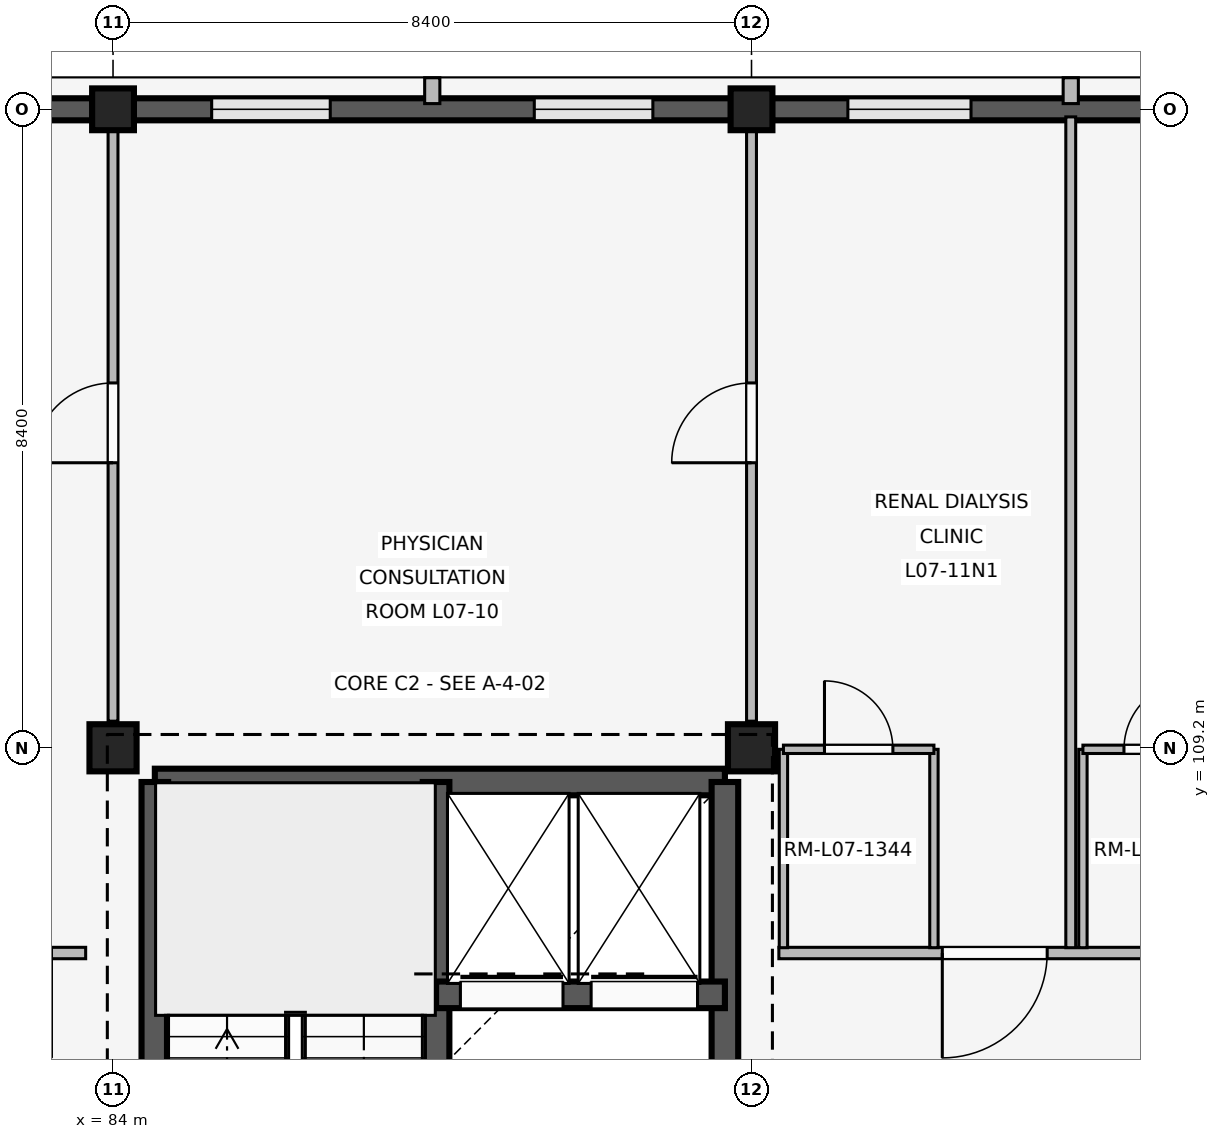
"""IFC4 building model, lengths in metres.
Left out: names, types, materials, properties, quantities, classifications, styles, units other than length and angle.
Written with IfcOpenShell. Run it as: python <this file> out.ifc"""

import sys

from ifc_helpers import new_model, si_unit, direction, frame, frame_2d, origin, origin_2d, place, context, subcontext, project, spatial, rectangle, extrude, element, fill, save


model = new_model("IFC4")
c1 = context("Model", 3, precision=1e-05, world=origin(), true_north=direction((0.0, 1.0)))
c2 = subcontext(c1, "Body", "Model", "MODEL_VIEW")
j1 = project(units=[si_unit("LENGTHUNIT", "METRE"), si_unit("PLANEANGLEUNIT", "RADIAN")], contexts=[c1])
p1 = place(None, origin())
s1 = spatial("IfcSite", under=j1, at=p1, CompositionType="ELEMENT")
p2 = place(p1, origin())
s2 = spatial("IfcBuilding", under=s1, at=p2, CompositionType="ELEMENT")
p3 = place(p2, frame((0.0, 0.0, 28.8)))
s3 = spatial("IfcBuildingStorey", under=s2, at=p3, CompositionType="ELEMENT", Elevation=28.8)
p4 = place(p3, frame((84.0, 109.2, 0.0), z_axis=(0.0, 0.0, 1.0), x_axis=(1.0, 0.0, 0.0)))
e1 = element("IfcColumn", 1, at=p4, inside=s3, PredefinedType="COLUMN", context=c2, shape_type="SweptSolid", body=[
    extrude(rectangle(XDim=0.62, YDim=0.62, at=origin_2d()), origin(), (0.0, 0.0, 1.0), 4.2),
])
p5 = place(p3, frame((84.0, 117.6, 0.0), z_axis=(0.0, 0.0, 1.0), x_axis=(1.0, 0.0, 0.0)))
e2 = element("IfcColumn", 2, at=p5, inside=s3, PredefinedType="COLUMN", context=c2, shape_type="SweptSolid", body=[
    extrude(rectangle(XDim=0.55, YDim=0.55, at=origin_2d()), origin(), (0.0, 0.0, 1.0), 4.2),
])
p6 = place(p3, frame((92.4, 109.2, 0.0), z_axis=(0.0, 0.0, 1.0), x_axis=(1.0, 0.0, 0.0)))
e3 = element("IfcColumn", 3, at=p6, inside=s3, PredefinedType="COLUMN", context=c2, shape_type="SweptSolid", body=[
    extrude(rectangle(XDim=0.62, YDim=0.62, at=origin_2d()), origin(), (0.0, 0.0, 1.0), 4.2),
])
p7 = place(p3, frame((92.4, 117.6, 0.0), z_axis=(0.0, 0.0, 1.0), x_axis=(1.0, 0.0, 0.0)))
e4 = element("IfcColumn", 4, at=p7, inside=s3, PredefinedType="COLUMN", context=c2, shape_type="SweptSolid", body=[
    extrude(rectangle(XDim=0.55, YDim=0.55, at=origin_2d()), origin(), (0.0, 0.0, 1.0), 4.2),
])
p8 = place(p3, frame((75.87, 117.6, 0.0), z_axis=(0.0, 0.0, 1.0), x_axis=(1.0, 0.0, 0.0)))
e5 = element("IfcWall", 5, at=p8, inside=s3, PredefinedType="SOLIDWALL", context=c2, shape_type="SweptSolid", body=[
    extrude(rectangle(XDim=7.86, YDim=0.29, at=frame_2d((3.93, 0.0))), origin(), (0.0, 0.0, 1.0), 3.34),
])
p9 = place(p8, frame((1.118, 0.0, 0.85)))
e6 = element("IfcOpeningElement", 6, at=p9, cuts=e5, PredefinedType="OPENING", context=c2, shape_type="SweptSolid", body=[
    extrude(rectangle(XDim=1.38, YDim=1.5, at=frame_2d((0.69, 0.75))), frame((0.0, 0.155, 0.0), z_axis=(0.0, -1.0, 0.0), x_axis=(1.0, 0.0, 0.0)), (0.0, 0.0, 1.0), 0.31),
])
p10 = place(p8, frame((5.362, 0.0, 0.85)))
e7 = element("IfcOpeningElement", 7, at=p10, cuts=e5, PredefinedType="OPENING", context=c2, shape_type="SweptSolid", body=[
    extrude(rectangle(XDim=1.38, YDim=1.5, at=frame_2d((0.69, 0.75))), frame((0.0, 0.155, 0.0), z_axis=(0.0, -1.0, 0.0), x_axis=(1.0, 0.0, 0.0)), (0.0, 0.0, 1.0), 0.31),
])
p11 = place(p3, frame((84.27, 117.6, 0.0), z_axis=(0.0, 0.0, 1.0), x_axis=(1.0, 0.0, 0.0)))
e8 = element("IfcWall", 8, at=p11, inside=s3, PredefinedType="SOLIDWALL", context=c2, shape_type="SweptSolid", body=[
    extrude(rectangle(XDim=7.86, YDim=0.29, at=frame_2d((3.93, 0.0))), origin(), (0.0, 0.0, 1.0), 3.34),
])
p12 = place(p11, frame((1.028, 0.0, 0.85)))
e9 = element("IfcOpeningElement", 9, at=p12, cuts=e8, PredefinedType="OPENING", context=c2, shape_type="SweptSolid", body=[
    extrude(rectangle(XDim=1.56, YDim=1.7, at=frame_2d((0.78, 0.85))), frame((0.0, 0.155, 0.0), z_axis=(0.0, -1.0, 0.0), x_axis=(1.0, 0.0, 0.0)), (0.0, 0.0, 1.0), 0.31),
])
p13 = place(p11, frame((5.272, 0.0, 0.85)))
e10 = element("IfcOpeningElement", 10, at=p13, cuts=e8, PredefinedType="OPENING", context=c2, shape_type="SweptSolid", body=[
    extrude(rectangle(XDim=1.56, YDim=1.7, at=frame_2d((0.78, 0.85))), frame((0.0, 0.155, 0.0), z_axis=(0.0, -1.0, 0.0), x_axis=(1.0, 0.0, 0.0)), (0.0, 0.0, 1.0), 0.31),
])
p14 = place(p3, frame((88.2, 117.675, 0.0), z_axis=(0.0, 0.0, 1.0), x_axis=(0.0, 1.0, 0.0)))
e11 = element("IfcWall", 11, at=p14, inside=s3, PredefinedType="ELEMENTEDWALL", context=c2, shape_type="SweptSolid", body=[
    extrude(rectangle(XDim=0.34, YDim=0.2, at=frame_2d((0.17, 0.0))), origin(), (0.0, 0.0, 1.0), 3.32),
])
p15 = place(p3, frame((92.67, 117.6, 0.0), z_axis=(0.0, 0.0, 1.0), x_axis=(1.0, 0.0, 0.0)))
e12 = element("IfcWall", 12, at=p15, inside=s3, PredefinedType="SOLIDWALL", context=c2, shape_type="SweptSolid", body=[
    extrude(rectangle(XDim=7.86, YDim=0.29, at=frame_2d((3.93, 0.0))), origin(), (0.0, 0.0, 1.0), 3.34),
])
p16 = place(p15, frame((0.998, 0.0, 0.85)))
e13 = element("IfcOpeningElement", 13, at=p16, cuts=e12, PredefinedType="OPENING", context=c2, shape_type="SweptSolid", body=[
    extrude(rectangle(XDim=1.62, YDim=1.8, at=frame_2d((0.81, 0.9))), frame((0.0, 0.155, 0.0), z_axis=(0.0, -1.0, 0.0), x_axis=(1.0, 0.0, 0.0)), (0.0, 0.0, 1.0), 0.31),
])
p17 = place(p15, frame((5.242, 0.0, 0.85)))
e14 = element("IfcOpeningElement", 14, at=p17, cuts=e12, PredefinedType="OPENING", context=c2, shape_type="SweptSolid", body=[
    extrude(rectangle(XDim=1.62, YDim=1.8, at=frame_2d((0.81, 0.9))), frame((0.0, 0.155, 0.0), z_axis=(0.0, -1.0, 0.0), x_axis=(1.0, 0.0, 0.0)), (0.0, 0.0, 1.0), 0.31),
])
p18 = place(p3, frame((96.6, 117.675, 0.0), z_axis=(0.0, 0.0, 1.0), x_axis=(0.0, 1.0, 0.0)))
e15 = element("IfcWall", 15, at=p18, inside=s3, PredefinedType="ELEMENTEDWALL", context=c2, shape_type="SweptSolid", body=[
    extrude(rectangle(XDim=0.34, YDim=0.2, at=frame_2d((0.17, 0.0))), origin(), (0.0, 0.0, 1.0), 3.32),
])
p19 = place(p3, frame((84.55, 108.75, 0.0), z_axis=(0.0, 0.0, 1.0), x_axis=(1.0, 0.0, 0.0)))
e16 = element("IfcWall", 16, at=p19, inside=s3, PredefinedType="SHEAR", context=c2, shape_type="SweptSolid", body=[
    extrude(rectangle(XDim=7.5, YDim=0.35, at=frame_2d((3.75, 0.0))), origin(), (0.0, 0.0, 1.0), 3.94),
])
p20 = place(p3, frame((84.55, 101.2, 0.0), z_axis=(0.0, 0.0, 1.0), x_axis=(0.0, 1.0, 0.0)))
e17 = element("IfcWall", 17, at=p20, inside=s3, PredefinedType="SHEAR", context=c2, shape_type="SweptSolid", body=[
    extrude(rectangle(XDim=7.55, YDim=0.35, at=frame_2d((3.775, 0.0))), origin(), (0.0, 0.0, 1.0), 3.94),
])
p21 = place(p20, frame((0.28, 0.0, 0.0)))
e18 = element("IfcOpeningElement", 18, at=p21, cuts=e17, PredefinedType="OPENING", context=c2, shape_type="SweptSolid", body=[
    extrude(rectangle(XDim=1.0, YDim=2.15, at=frame_2d((0.5, 1.075))), frame((0.0, 0.185, 0.0), z_axis=(0.0, -1.0, 0.0), x_axis=(1.0, 0.0, 0.0)), (0.0, 0.0, 1.0), 0.37),
])
p22 = place(p3, frame((92.05, 101.2, 0.0), z_axis=(0.0, 0.0, 1.0), x_axis=(0.0, 1.0, 0.0)))
e19 = element("IfcWall", 19, at=p22, inside=s3, PredefinedType="SHEAR", context=c2, shape_type="SweptSolid", body=[
    extrude(rectangle(XDim=7.55, YDim=0.35, at=frame_2d((3.775, 0.0))), origin(), (0.0, 0.0, 1.0), 3.94),
])
p23 = place(p22, frame((2.4, 0.0, 0.0)))
e20 = element("IfcOpeningElement", 20, at=p23, cuts=e19, PredefinedType="OPENING", context=c2, shape_type="SweptSolid", body=[
    extrude(rectangle(XDim=1.2, YDim=2.2, at=frame_2d((0.6, 1.1))), frame((0.0, 0.185, 0.0), z_axis=(0.0, -1.0, 0.0), x_axis=(1.0, 0.0, 0.0)), (0.0, 0.0, 1.0), 0.37),
])
p24 = place(p3, frame((88.25, 101.2, 0.0), z_axis=(0.0, 0.0, 1.0), x_axis=(0.0, 1.0, 0.0)))
e21 = element("IfcWall", 21, at=p24, inside=s3, PredefinedType="SHEAR", context=c2, shape_type="SweptSolid", body=[
    extrude(rectangle(XDim=7.55, YDim=0.35, at=frame_2d((3.775, 0.0))), origin(), (0.0, 0.0, 1.0), 3.94),
])
p25 = place(p24, frame((0.28, 0.0, 0.0)))
e22 = element("IfcOpeningElement", 22, at=p25, cuts=e21, PredefinedType="OPENING", context=c2, shape_type="SweptSolid", body=[
    extrude(rectangle(XDim=1.0, YDim=2.15, at=frame_2d((0.5, 1.075))), frame((0.0, 0.185, 0.0), z_axis=(0.0, -1.0, 0.0), x_axis=(1.0, 0.0, 0.0)), (0.0, 0.0, 1.0), 0.37),
])
p26 = place(p3, frame((88.25, 105.95, 0.0), z_axis=(0.0, 0.0, 1.0), x_axis=(1.0, 0.0, 0.0)))
e23 = element("IfcWall", 23, at=p26, inside=s3, PredefinedType="SHEAR", context=c2, shape_type="SweptSolid", body=[
    extrude(rectangle(XDim=3.8, YDim=0.35, at=frame_2d((1.9, 0.0))), origin(), (0.0, 0.0, 1.0), 3.94),
])
p27 = place(p26, frame((0.32, 0.0, 0.0)))
e24 = element("IfcOpeningElement", 24, at=p27, cuts=e23, PredefinedType="OPENING", context=c2, shape_type="SweptSolid", body=[
    extrude(rectangle(XDim=1.35, YDim=2.25, at=frame_2d((0.675, 1.125))), frame((0.0, 0.185, 0.0), z_axis=(0.0, -1.0, 0.0), x_axis=(1.0, 0.0, 0.0)), (0.0, 0.0, 1.0), 0.37),
])
p28 = place(p26, frame((2.04, 0.0, 0.0)))
e25 = element("IfcOpeningElement", 25, at=p28, cuts=e23, PredefinedType="OPENING", context=c2, shape_type="SweptSolid", body=[
    extrude(rectangle(XDim=1.4, YDim=2.25, at=frame_2d((0.7, 1.125))), frame((0.0, 0.185, 0.0), z_axis=(0.0, -1.0, 0.0), x_axis=(1.0, 0.0, 0.0)), (0.0, 0.0, 1.0), 0.37),
])
p29 = place(p3, frame((83.64, 106.5, 0.0), z_axis=(0.0, 0.0, 1.0), x_axis=(-1.0, 0.0, 0.0)))
e26 = element("IfcWall", 26, at=p29, inside=s3, PredefinedType="PARTITIONING", context=c2, shape_type="SweptSolid", body=[
    extrude(rectangle(XDim=7.96, YDim=0.15, at=frame_2d((3.98, 0.0))), origin(), (0.0, 0.0, 1.0), 3.32),
])
p30 = place(p29, frame((0.45, 0.0, 0.0)))
e27 = element("IfcOpeningElement", 27, at=p30, cuts=e26, PredefinedType="OPENING", context=c2, shape_type="SweptSolid", body=[
    extrude(rectangle(XDim=1.38, YDim=2.25, at=frame_2d((0.69, 1.125))), frame((0.0, 0.085, 0.0), z_axis=(0.0, -1.0, 0.0), x_axis=(1.0, 0.0, 0.0)), (0.0, 0.0, 1.0), 0.17),
])
p31 = place(p29, frame((4.15, 0.0, 0.0)))
e28 = element("IfcOpeningElement", 28, at=p31, cuts=e26, PredefinedType="OPENING", context=c2, shape_type="SweptSolid", body=[
    extrude(rectangle(XDim=1.38, YDim=2.25, at=frame_2d((0.69, 1.125))), frame((0.0, 0.085, 0.0), z_axis=(0.0, -1.0, 0.0), x_axis=(1.0, 0.0, 0.0)), (0.0, 0.0, 1.0), 0.17),
])
p32 = place(p3, frame((84.0, 109.55, 0.0), z_axis=(0.0, 0.0, 1.0), x_axis=(0.0, 1.0, 0.0)))
e29 = element("IfcWall", 29, at=p32, inside=s3, PredefinedType="PARTITIONING", context=c2, shape_type="SweptSolid", body=[
    extrude(rectangle(XDim=7.91, YDim=0.13, at=frame_2d((3.955, 0.0))), origin(), (0.0, 0.0, 1.0), 3.32),
])
p33 = place(p32, frame((3.4, 0.0, 0.0)))
e30 = element("IfcOpeningElement", 30, at=p33, cuts=e29, PredefinedType="OPENING", context=c2, shape_type="SweptSolid", body=[
    extrude(rectangle(XDim=1.05, YDim=2.2, at=frame_2d((0.525, 1.1))), frame((0.0, 0.075, 0.0), z_axis=(0.0, -1.0, 0.0), x_axis=(1.0, 0.0, 0.0)), (0.0, 0.0, 1.0), 0.15),
])
p34 = place(p3, frame((92.4, 109.55, 0.0), z_axis=(0.0, 0.0, 1.0), x_axis=(0.0, 1.0, 0.0)))
e31 = element("IfcWall", 31, at=p34, inside=s3, PredefinedType="PARTITIONING", context=c2, shape_type="SweptSolid", body=[
    extrude(rectangle(XDim=7.91, YDim=0.13, at=frame_2d((3.955, 0.0))), origin(), (0.0, 0.0, 1.0), 3.32),
])
p35 = place(p34, frame((3.4, 0.0, 0.0)))
e32 = element("IfcOpeningElement", 32, at=p35, cuts=e31, PredefinedType="OPENING", context=c2, shape_type="SweptSolid", body=[
    extrude(rectangle(XDim=1.05, YDim=2.2, at=frame_2d((0.525, 1.1))), frame((0.0, 0.075, 0.0), z_axis=(0.0, -1.0, 0.0), x_axis=(1.0, 0.0, 0.0)), (0.0, 0.0, 1.0), 0.15),
])
p36 = place(p3, frame((100.72, 106.5, 0.0), z_axis=(0.0, 0.0, 1.0), x_axis=(-1.0, 0.0, 0.0)))
e33 = element("IfcWall", 33, at=p36, inside=s3, PredefinedType="PARTITIONING", context=c2, shape_type="SweptSolid", body=[
    extrude(rectangle(XDim=7.96, YDim=0.15, at=frame_2d((3.98, 0.0))), origin(), (0.0, 0.0, 1.0), 3.32),
])
p37 = place(p36, frame((0.73, 0.0, 0.0)))
e34 = element("IfcOpeningElement", 34, at=p37, cuts=e33, PredefinedType="OPENING", context=c2, shape_type="SweptSolid", body=[
    extrude(rectangle(XDim=1.38, YDim=2.25, at=frame_2d((0.69, 1.125))), frame((0.0, 0.085, 0.0), z_axis=(0.0, -1.0, 0.0), x_axis=(1.0, 0.0, 0.0)), (0.0, 0.0, 1.0), 0.17),
])
p38 = place(p36, frame((4.43, 0.0, 0.0)))
e35 = element("IfcOpeningElement", 35, at=p38, cuts=e33, PredefinedType="OPENING", context=c2, shape_type="SweptSolid", body=[
    extrude(rectangle(XDim=1.38, YDim=2.25, at=frame_2d((0.69, 1.125))), frame((0.0, 0.085, 0.0), z_axis=(0.0, -1.0, 0.0), x_axis=(1.0, 0.0, 0.0)), (0.0, 0.0, 1.0), 0.17),
])
p39 = place(p3, frame((96.6, 106.57, 0.0), z_axis=(0.0, 0.0, 1.0), x_axis=(0.0, 1.0, 0.0)))
e36 = element("IfcWall", 36, at=p39, inside=s3, PredefinedType="PARTITIONING", context=c2, shape_type="SweptSolid", body=[
    extrude(rectangle(XDim=10.93, YDim=0.13, at=frame_2d((5.465, 0.0))), origin(), (0.0, 0.0, 1.0), 3.32),
])
for number, where, z_axis, x_axis in (
    (37, (92.82, 106.57, 0.0), (0.0, 0.0, 1.0), (0.0, 1.0, 0.0)),
    (38, (94.8, 106.57, 0.0), (0.0, 0.0, 1.0), (0.0, 1.0, 0.0)),
):
    element("IfcWall", number, at=place(p3, frame(where, z_axis=z_axis, x_axis=x_axis)), inside=s3, PredefinedType="PARTITIONING", context=c2, shape_type="SweptSolid", body=[
        extrude(rectangle(XDim=2.61, YDim=0.11, at=frame_2d((1.305, 0.0))), origin(), (0.0, 0.0, 1.0), 3.32),
    ])
p40 = place(p3, frame((92.82, 109.18, 0.0), z_axis=(0.0, 0.0, 1.0), x_axis=(1.0, 0.0, 0.0)))
e39 = element("IfcWall", 39, at=p40, inside=s3, PredefinedType="PARTITIONING", context=c2, shape_type="SweptSolid", body=[
    extrude(rectangle(XDim=1.98, YDim=0.11, at=frame_2d((0.99, 0.0))), origin(), (0.0, 0.0, 1.0), 3.32),
])
p41 = place(p40, frame((0.54, 0.0, 0.0)))
e40 = element("IfcOpeningElement", 40, at=p41, cuts=e39, PredefinedType="OPENING", context=c2, shape_type="SweptSolid", body=[
    extrude(rectangle(XDim=0.9, YDim=2.1, at=frame_2d((0.45, 1.05))), frame((0.0, 0.065, 0.0), z_axis=(0.0, -1.0, 0.0), x_axis=(1.0, 0.0, 0.0)), (0.0, 0.0, 1.0), 0.13),
])
p42 = place(p3, frame((96.76, 106.57, 0.0), z_axis=(0.0, 0.0, 1.0), x_axis=(0.0, 1.0, 0.0)))
e41 = element("IfcWall", 41, at=p42, inside=s3, PredefinedType="PARTITIONING", context=c2, shape_type="SweptSolid", body=[
    extrude(rectangle(XDim=2.61, YDim=0.11, at=frame_2d((1.305, 0.0))), origin(), (0.0, 0.0, 1.0), 3.32),
])
p43 = place(p3, frame((96.76, 109.18, 0.0), z_axis=(0.0, 0.0, 1.0), x_axis=(1.0, 0.0, 0.0)))
e42 = element("IfcWall", 42, at=p43, inside=s3, PredefinedType="PARTITIONING", context=c2, shape_type="SweptSolid", body=[
    extrude(rectangle(XDim=1.98, YDim=0.11, at=frame_2d((0.99, 0.0))), origin(), (0.0, 0.0, 1.0), 3.32),
])
p44 = place(p43, frame((0.54, 0.0, 0.0)))
e43 = element("IfcOpeningElement", 43, at=p44, cuts=e42, PredefinedType="OPENING", context=c2, shape_type="SweptSolid", body=[
    extrude(rectangle(XDim=0.9, YDim=2.1, at=frame_2d((0.45, 1.05))), frame((0.0, 0.065, 0.0), z_axis=(0.0, -1.0, 0.0), x_axis=(1.0, 0.0, 0.0)), (0.0, 0.0, 1.0), 0.13),
])
p45 = place(p12, origin())
e44 = element("IfcWindow", 44, at=p45, inside=s3, PartitioningType="SINGLE_PANEL", PredefinedType="WINDOW", context=c2, shape_type="SweptSolid", body=[
    extrude(rectangle(XDim=1.56, YDim=1.7, at=frame_2d((0.78, 0.85))), frame((0.0, 0.03, 0.0), z_axis=(0.0, -1.0, 0.0), x_axis=(1.0, 0.0, 0.0)), (0.0, 0.0, 1.0), 0.06),
])
fill(e9, e44)
p46 = place(p13, origin())
e45 = element("IfcWindow", 45, at=p46, inside=s3, PartitioningType="SINGLE_PANEL", PredefinedType="WINDOW", context=c2, shape_type="SweptSolid", body=[
    extrude(rectangle(XDim=1.56, YDim=1.7, at=frame_2d((0.78, 0.85))), frame((0.0, 0.03, 0.0), z_axis=(0.0, -1.0, 0.0), x_axis=(1.0, 0.0, 0.0)), (0.0, 0.0, 1.0), 0.06),
])
fill(e10, e45)
p47 = place(p16, origin())
e46 = element("IfcWindow", 46, at=p47, inside=s3, PartitioningType="SINGLE_PANEL", PredefinedType="WINDOW", context=c2, shape_type="SweptSolid", body=[
    extrude(rectangle(XDim=1.62, YDim=1.8, at=frame_2d((0.81, 0.9))), frame((0.0, 0.03, 0.0), z_axis=(0.0, -1.0, 0.0), x_axis=(1.0, 0.0, 0.0)), (0.0, 0.0, 1.0), 0.06),
])
fill(e13, e46)
p48 = place(p27, origin())
e47 = element("IfcDoor", 47, at=p48, inside=s3, OperationType="SLIDING_TO_LEFT", PredefinedType="DOOR", context=c2, shape_type="SweptSolid", body=[
    extrude(rectangle(XDim=1.35, YDim=2.25, at=frame_2d((0.675, 1.125))), frame((0.0, 0.025, 0.0), z_axis=(0.0, -1.0, 0.0), x_axis=(1.0, 0.0, 0.0)), (0.0, 0.0, 1.0), 0.05),
])
fill(e24, e47)
p49 = place(p28, origin())
e48 = element("IfcDoor", 48, at=p49, inside=s3, OperationType="SLIDING_TO_LEFT", PredefinedType="DOOR", context=c2, shape_type="SweptSolid", body=[
    extrude(rectangle(XDim=1.4, YDim=2.25, at=frame_2d((0.7, 1.125))), frame((0.0, 0.025, 0.0), z_axis=(0.0, -1.0, 0.0), x_axis=(1.0, 0.0, 0.0)), (0.0, 0.0, 1.0), 0.05),
])
fill(e25, e48)
p50 = place(p33, origin())
e49 = element("IfcDoor", 49, at=p50, inside=s3, OperationType="SINGLE_SWING_LEFT", PredefinedType="DOOR", context=c2, shape_type="SweptSolid", body=[
    extrude(rectangle(XDim=1.05, YDim=2.2, at=frame_2d((0.525, 1.1))), frame((0.0, 0.025, 0.0), z_axis=(0.0, -1.0, 0.0), x_axis=(1.0, 0.0, 0.0)), (0.0, 0.0, 1.0), 0.05),
])
fill(e30, e49)
p51 = place(p35, origin())
e50 = element("IfcDoor", 50, at=p51, inside=s3, OperationType="SINGLE_SWING_LEFT", PredefinedType="DOOR", context=c2, shape_type="SweptSolid", body=[
    extrude(rectangle(XDim=1.05, YDim=2.2, at=frame_2d((0.525, 1.1))), frame((0.0, 0.025, 0.0), z_axis=(0.0, -1.0, 0.0), x_axis=(1.0, 0.0, 0.0)), (0.0, 0.0, 1.0), 0.05),
])
fill(e32, e50)
p52 = place(p38, origin())
e51 = element("IfcDoor", 51, at=p52, inside=s3, OperationType="SINGLE_SWING_RIGHT", PredefinedType="DOOR", context=c2, shape_type="SweptSolid", body=[
    extrude(rectangle(XDim=1.38, YDim=2.25, at=frame_2d((0.69, 1.125))), frame((0.0, 0.025, 0.0), z_axis=(0.0, -1.0, 0.0), x_axis=(1.0, 0.0, 0.0)), (0.0, 0.0, 1.0), 0.05),
])
fill(e35, e51)
p53 = place(p41, origin())
e52 = element("IfcDoor", 52, at=p53, inside=s3, OperationType="SINGLE_SWING_LEFT", PredefinedType="DOOR", context=c2, shape_type="SweptSolid", body=[
    extrude(rectangle(XDim=0.9, YDim=2.1, at=frame_2d((0.45, 1.05))), frame((0.0, 0.025, 0.0), z_axis=(0.0, -1.0, 0.0), x_axis=(1.0, 0.0, 0.0)), (0.0, 0.0, 1.0), 0.05),
])
fill(e40, e52)
p54 = place(p44, origin())
e53 = element("IfcDoor", 53, at=p54, inside=s3, OperationType="SINGLE_SWING_RIGHT", PredefinedType="DOOR", context=c2, shape_type="SweptSolid", body=[
    extrude(rectangle(XDim=0.9, YDim=2.1, at=frame_2d((0.45, 1.05))), frame((0.0, 0.025, 0.0), z_axis=(0.0, -1.0, 0.0), x_axis=(1.0, 0.0, 0.0)), (0.0, 0.0, 1.0), 0.05),
])
fill(e43, e53)
save(model, sys.argv[1])
